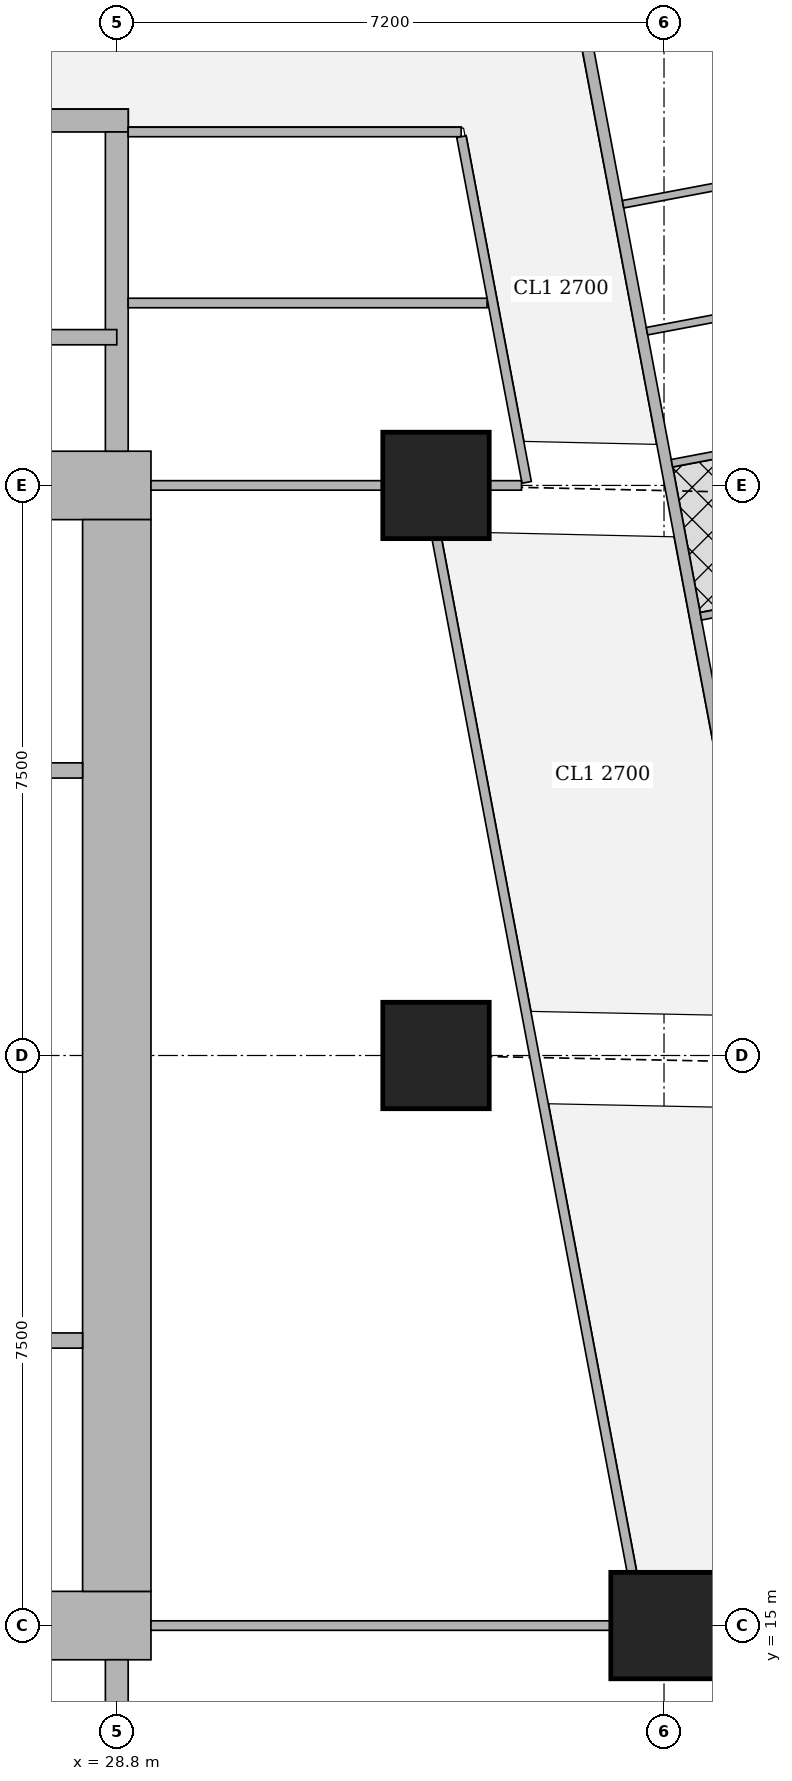
"""IFC4 building model, lengths in metres.
Left out: names, types, materials, properties, quantities, classifications, styles, units other than length and angle.
Written with IfcOpenShell. Run it as: python <this file> out.ifc"""

import sys

from ifc_helpers import new_model, si_unit, direction, frame, frame_2d, origin, origin_2d, place, context, subcontext, project, spatial, rectangle, extrude, element, fill, save


model = new_model("IFC4")
c1 = context("Model", 3, precision=1e-05, world=origin(), true_north=direction((0.0, 1.0)))
c2 = subcontext(c1, "Body", "Model", "MODEL_VIEW")
j1 = project(units=[si_unit("LENGTHUNIT", "METRE"), si_unit("PLANEANGLEUNIT", "RADIAN")], contexts=[c1])
p1 = place(None, origin())
s1 = spatial("IfcSite", under=j1, at=p1, CompositionType="ELEMENT")
p2 = place(p1, origin())
s2 = spatial("IfcBuilding", under=s1, at=p2, CompositionType="ELEMENT")
p3 = place(p2, frame((0.0, 0.0, 223.7)))
s3 = spatial("IfcBuildingStorey", under=s2, at=p3, CompositionType="ELEMENT", Elevation=223.7)
for number, where, z_axis, x_axis in (
    (1, (36.0, 15.0, 0.0), (0.0, 0.0, 1.0), (1.0, 0.0, 0.0)),
    (2, (33.0, 22.5, 0.0), (0.0, 0.0, 1.0), (1.0, 0.0, 0.0)),
    (3, (33.0, 30.0, 0.0), (0.0, 0.0, 1.0), (1.0, 0.0, 0.0)),
):
    element("IfcColumn", number, at=place(p3, frame(where, z_axis=z_axis, x_axis=x_axis)), inside=s3, PredefinedType="COLUMN", context=c2, shape_type="SweptSolid", body=[
        extrude(rectangle(XDim=1.4, YDim=1.4, at=origin_2d()), origin(), (0.0, 0.0, 1.0), 3.75),
    ])
p4 = place(p3, frame((13.95, 15.0, 0.0), z_axis=(0.0, 0.0, 1.0), x_axis=(1.0, 0.0, 0.0)))
e4 = element("IfcWall", 4, at=p4, inside=s3, PredefinedType="SHEAR", context=c2, shape_type="SweptSolid", body=[
    extrude(rectangle(XDim=15.3, YDim=0.9, at=frame_2d((7.65, 0.0))), origin(), (0.0, 0.0, 1.0), 3.75),
])
p5 = place(p4, frame((4.45, 0.0, 0.0)))
e5 = element("IfcOpeningElement", 5, at=p5, cuts=e4, PredefinedType="OPENING", context=c2, shape_type="SweptSolid", body=[
    extrude(rectangle(XDim=1.8, YDim=2.1, at=frame_2d((0.9, 1.05))), frame((0.0, 0.46, 0.0), z_axis=(0.0, -1.0, 0.0), x_axis=(1.0, 0.0, 0.0)), (0.0, 0.0, 1.0), 0.92),
])
p6 = place(p4, frame((10.7, 0.0, 0.0)))
e6 = element("IfcOpeningElement", 6, at=p6, cuts=e4, PredefinedType="OPENING", context=c2, shape_type="SweptSolid", body=[
    extrude(rectangle(XDim=1.1, YDim=2.1, at=frame_2d((0.55, 1.05))), frame((0.0, 0.46, 0.0), z_axis=(0.0, -1.0, 0.0), x_axis=(1.0, 0.0, 0.0)), (0.0, 0.0, 1.0), 0.92),
])
p7 = place(p3, frame((13.95, 30.0, 0.0), z_axis=(0.0, 0.0, 1.0), x_axis=(1.0, 0.0, 0.0)))
e7 = element("IfcWall", 7, at=p7, inside=s3, PredefinedType="SHEAR", context=c2, shape_type="SweptSolid", body=[
    extrude(rectangle(XDim=15.3, YDim=0.9, at=frame_2d((7.65, 0.0))), origin(), (0.0, 0.0, 1.0), 3.75),
])
p8 = place(p7, frame((4.45, 0.0, 0.0)))
e8 = element("IfcOpeningElement", 8, at=p8, cuts=e7, PredefinedType="OPENING", context=c2, shape_type="SweptSolid", body=[
    extrude(rectangle(XDim=1.8, YDim=2.1, at=frame_2d((0.9, 1.05))), frame((0.0, 0.46, 0.0), z_axis=(0.0, -1.0, 0.0), x_axis=(1.0, 0.0, 0.0)), (0.0, 0.0, 1.0), 0.92),
])
p9 = place(p7, frame((10.7, 0.0, 0.0)))
e9 = element("IfcOpeningElement", 9, at=p9, cuts=e7, PredefinedType="OPENING", context=c2, shape_type="SweptSolid", body=[
    extrude(rectangle(XDim=1.1, YDim=2.1, at=frame_2d((0.55, 1.05))), frame((0.0, 0.46, 0.0), z_axis=(0.0, -1.0, 0.0), x_axis=(1.0, 0.0, 0.0)), (0.0, 0.0, 1.0), 0.92),
])
p10 = place(p3, frame((28.8, 15.45, 0.0), z_axis=(0.0, 0.0, 1.0), x_axis=(0.0, 1.0, 0.0)))
e10 = element("IfcWall", 10, at=p10, inside=s3, PredefinedType="SHEAR", context=c2, shape_type="SweptSolid", body=[
    extrude(rectangle(XDim=14.1, YDim=0.9, at=frame_2d((7.05, 0.0))), origin(), (0.0, 0.0, 1.0), 3.75),
])
p11 = place(p3, frame((28.8, 10.35, 0.0), z_axis=(0.0, 0.0, 1.0), x_axis=(0.0, 1.0, 0.0)))
e11 = element("IfcWall", 11, at=p11, inside=s3, PredefinedType="SHEAR", context=c2, shape_type="SweptSolid", body=[
    extrude(rectangle(XDim=4.2, YDim=0.3, at=frame_2d((2.1, 0.0))), origin(), (0.0, 0.0, 1.0), 3.75),
])
p12 = place(p3, frame((21.45, 34.8, 0.0), z_axis=(0.0, 0.0, 1.0), x_axis=(1.0, 0.0, 0.0)))
e12 = element("IfcWall", 12, at=p12, inside=s3, PredefinedType="SHEAR", context=c2, shape_type="SweptSolid", body=[
    extrude(rectangle(XDim=7.5, YDim=0.3, at=frame_2d((3.75, 0.0))), origin(), (0.0, 0.0, 1.0), 3.75),
])
p13 = place(p12, frame((0.5, 0.0, 0.0)))
e13 = element("IfcOpeningElement", 13, at=p13, cuts=e12, PredefinedType="OPENING", context=c2, shape_type="SweptSolid", body=[
    extrude(rectangle(XDim=1.1, YDim=2.1, at=frame_2d((0.55, 1.05))), frame((0.0, 0.16, 0.0), z_axis=(0.0, -1.0, 0.0), x_axis=(1.0, 0.0, 0.0)), (0.0, 0.0, 1.0), 0.32),
])
p14 = place(p3, frame((28.8, 30.45, 0.0), z_axis=(0.0, 0.0, 1.0), x_axis=(0.0, 1.0, 0.0)))
e14 = element("IfcWall", 14, at=p14, inside=s3, PredefinedType="SHEAR", context=c2, shape_type="SweptSolid", body=[
    extrude(rectangle(XDim=4.2, YDim=0.3, at=frame_2d((2.1, 0.0))), origin(), (0.0, 0.0, 1.0), 3.75),
])
p15 = place(p3, frame((33.68, 42.723, 0.0), z_axis=(0.0, 0.0, 1.0), x_axis=(0.185601160014, -0.982625162207, 0.0)))
e15 = element("IfcWall", 15, at=p15, inside=s3, PredefinedType="SOLIDWALL", context=c2, shape_type="SweptSolid", body=[
    extrude(rectangle(XDim=41.051, YDim=0.15, at=frame_2d((20.526, 0.0))), origin(), (0.0, 0.0, 1.0), 2.5),
])
p16 = place(p15, frame((16.123, 0.0, 0.0)))
e16 = element("IfcOpeningElement", 16, at=p16, cuts=e15, PredefinedType="OPENING", context=c2, shape_type="SweptSolid", body=[
    extrude(rectangle(XDim=1.0, YDim=2.1, at=frame_2d((0.5, 1.05))), frame((0.0, 0.085, 0.0), z_axis=(0.0, -1.0, 0.0), x_axis=(1.0, 0.0, 0.0)), (0.0, 0.0, 1.0), 0.17),
])
p17 = place(p15, frame((19.938, 0.0, 0.0)))
e17 = element("IfcOpeningElement", 17, at=p17, cuts=e15, PredefinedType="OPENING", context=c2, shape_type="SweptSolid", body=[
    extrude(rectangle(XDim=1.0, YDim=2.1, at=frame_2d((0.5, 1.05))), frame((0.0, 0.085, 0.0), z_axis=(0.0, -1.0, 0.0), x_axis=(1.0, 0.0, 0.0)), (0.0, 0.0, 1.0), 0.17),
])
p18 = place(p15, frame((30.902, 0.0, 0.0)))
e18 = element("IfcOpeningElement", 18, at=p18, cuts=e15, PredefinedType="OPENING", context=c2, shape_type="SweptSolid", body=[
    extrude(rectangle(XDim=1.0, YDim=2.1, at=frame_2d((0.5, 1.05))), frame((0.0, 0.085, 0.0), z_axis=(0.0, -1.0, 0.0), x_axis=(1.0, 0.0, 0.0)), (0.0, 0.0, 1.0), 0.17),
])
p19 = place(p3, frame((39.24, 32.683, 0.0), z_axis=(0.0, 0.0, 1.0), x_axis=(-0.982638553676, -0.185530247748, 0.0)))
e19 = element("IfcWall", 19, at=p19, inside=s3, PredefinedType="PARTITIONING", context=c2, shape_type="SweptSolid", body=[
    extrude(rectangle(XDim=3.525, YDim=0.1, at=frame_2d((1.763, 0.0))), origin(), (0.0, 0.0, 1.0), 3.5),
])
p20 = place(p3, frame((39.997, 28.942, 0.0), z_axis=(0.0, 0.0, 1.0), x_axis=(-0.982613029841, -0.185665380691, 0.0)))
e20 = element("IfcWall", 20, at=p20, inside=s3, PredefinedType="PARTITIONING", context=c2, shape_type="SweptSolid", body=[
    extrude(rectangle(XDim=3.575, YDim=0.1, at=frame_2d((1.788, 0.0))), origin(), (0.0, 0.0, 1.0), 3.5),
])
p21 = place(p3, frame((39.567, 30.947, 0.0), z_axis=(0.0, 0.0, 1.0), x_axis=(-0.982576058723, -0.185860939478, 0.0)))
e21 = element("IfcWall", 21, at=p21, inside=s3, PredefinedType="PARTITIONING", context=c2, shape_type="SweptSolid", body=[
    extrude(rectangle(XDim=3.524, YDim=0.1, at=frame_2d((1.762, 0.0))), origin(), (0.0, 0.0, 1.0), 2.5),
])
p22 = place(p3, frame((38.924, 34.353, 0.0), z_axis=(0.0, 0.0, 1.0), x_axis=(-0.982629014545, -0.18558076348, 0.0)))
e22 = element("IfcWall", 22, at=p22, inside=s3, PredefinedType="PARTITIONING", context=c2, shape_type="SweptSolid", body=[
    extrude(rectangle(XDim=3.524, YDim=0.1, at=frame_2d((1.762, 0.0))), origin(), (0.0, 0.0, 1.0), 3.5),
])
p23 = place(p3, frame((28.95, 34.65, 0.0), z_axis=(0.0, 0.0, 1.0), x_axis=(1.0, 0.0, 0.0)))
e23 = element("IfcWall", 23, at=p23, inside=s3, PredefinedType="PARTITIONING", context=c2, shape_type="SweptSolid", body=[
    extrude(rectangle(XDim=4.381, YDim=0.125, at=frame_2d((2.19, 0.0))), origin(), (0.0, 0.0, 1.0), 3.5),
])
p24 = place(p3, frame((34.193, 30.04, 0.0), z_axis=(0.0, 0.0, 1.0), x_axis=(-0.185626015863, 0.982620467034, 0.0)))
e24 = element("IfcWall", 24, at=p24, inside=s3, PredefinedType="PARTITIONING", context=c2, shape_type="SweptSolid", body=[
    extrude(rectangle(XDim=4.628, YDim=0.125, at=frame_2d((2.314, 0.0))), origin(), (0.0, 0.0, 1.0), 2.5),
])
p25 = place(p24, frame((0.95, 0.0, 0.0)))
e25 = element("IfcOpeningElement", 25, at=p25, cuts=e24, PredefinedType="OPENING", context=c2, shape_type="SweptSolid", body=[
    extrude(rectangle(XDim=1.0, YDim=2.1, at=frame_2d((0.5, 1.05))), frame((0.0, 0.073, 0.0), z_axis=(0.0, -1.0, 0.0), x_axis=(1.0, 0.0, 0.0)), (0.0, 0.0, 1.0), 0.145),
])
p26 = place(p24, frame((3.225, 0.0, 0.0)))
e26 = element("IfcOpeningElement", 26, at=p26, cuts=e24, PredefinedType="OPENING", context=c2, shape_type="SweptSolid", body=[
    extrude(rectangle(XDim=1.0, YDim=2.1, at=frame_2d((0.5, 1.05))), frame((0.0, 0.073, 0.0), z_axis=(0.0, -1.0, 0.0), x_axis=(1.0, 0.0, 0.0)), (0.0, 0.0, 1.0), 0.145),
])
p27 = place(p3, frame((35.576, 15.713, 0.0), z_axis=(0.0, 0.0, 1.0), x_axis=(-0.185602982696, 0.982624817931, 0.0)))
e27 = element("IfcWall", 27, at=p27, inside=s3, PredefinedType="PARTITIONING", context=c2, shape_type="SweptSolid", body=[
    extrude(rectangle(XDim=13.814, YDim=0.125, at=frame_2d((6.907, 0.0))), origin(), (0.0, 0.0, 1.0), 2.5),
])
p28 = place(p27, frame((5.3, 0.0, 0.0)))
e28 = element("IfcOpeningElement", 28, at=p28, cuts=e27, PredefinedType="OPENING", context=c2, shape_type="SweptSolid", body=[
    extrude(rectangle(XDim=1.0, YDim=2.1, at=frame_2d((0.5, 1.05))), frame((0.0, 0.073, 0.0), z_axis=(0.0, -1.0, 0.0), x_axis=(1.0, 0.0, 0.0)), (0.0, 0.0, 1.0), 0.145),
])
p29 = place(p3, frame((29.25, 15.0, 0.0), z_axis=(0.0, 0.0, 1.0), x_axis=(1.0, 0.0, 0.0)))
e29 = element("IfcWall", 29, at=p29, inside=s3, PredefinedType="PARTITIONING", context=c2, shape_type="SweptSolid", body=[
    extrude(rectangle(XDim=6.049, YDim=0.125, at=frame_2d((3.024, 0.0))), origin(), (0.0, 0.0, 1.0), 3.5),
])
p30 = place(p3, frame((29.25, 30.0, 0.0), z_axis=(0.0, 0.0, 1.0), x_axis=(1.0, 0.0, 0.0)))
e30 = element("IfcWall", 30, at=p30, inside=s3, PredefinedType="PARTITIONING", context=c2, shape_type="SweptSolid", body=[
    extrude(rectangle(XDim=3.049, YDim=0.125, at=frame_2d((1.524, 0.0))), origin(), (0.0, 0.0, 1.0), 3.5),
])
p31 = place(p3, frame((33.701, 30.0, 0.0), z_axis=(0.0, 0.0, 1.0), x_axis=(1.0, 0.0, 0.0)))
e31 = element("IfcWall", 31, at=p31, inside=s3, PredefinedType="PARTITIONING", context=c2, shape_type="SweptSolid", body=[
    extrude(rectangle(XDim=0.424, YDim=0.125, at=frame_2d((0.212, 0.0))), origin(), (0.0, 0.0, 1.0), 2.5),
])
p32 = place(p3, frame((28.95, 32.4, 0.0), z_axis=(0.0, 0.0, 1.0), x_axis=(1.0, 0.0, 0.0)))
e32 = element("IfcWall", 32, at=p32, inside=s3, PredefinedType="PARTITIONING", context=c2, shape_type="SweptSolid", body=[
    extrude(rectangle(XDim=4.722, YDim=0.125, at=frame_2d((2.361, 0.0))), origin(), (0.0, 0.0, 1.0), 3.5),
])
p33 = place(p3, frame((23.0, 31.95, 0.0), z_axis=(0.0, 0.0, 1.0), x_axis=(1.0, 0.0, 0.0)))
e33 = element("IfcWall", 33, at=p33, inside=s3, PredefinedType="SHEAR", context=c2, shape_type="SweptSolid", body=[
    extrude(rectangle(XDim=5.8, YDim=0.2, at=frame_2d((2.9, 0.0))), origin(), (0.0, 0.0, 1.0), 3.75),
])
for number, where, z_axis, x_axis in (
    (34, (27.4, 18.75, 0.0), (0.0, 0.0, 1.0), (1.0, 0.0, 0.0)),
    (35, (27.4, 26.25, 0.0), (0.0, 0.0, 1.0), (1.0, 0.0, 0.0)),
):
    element("IfcWall", number, at=place(p3, frame(where, z_axis=z_axis, x_axis=x_axis)), inside=s3, PredefinedType="SOLIDWALL", context=c2, shape_type="SweptSolid", body=[
        extrude(rectangle(XDim=0.95, YDim=0.2, at=frame_2d((0.475, 0.0))), origin(), (0.0, 0.0, 1.0), 3.5),
    ])
p34 = place(p28, origin())
e36 = element("IfcDoor", 36, at=p34, inside=s3, OperationType="SINGLE_SWING_LEFT", PredefinedType="DOOR", context=c2, shape_type="SweptSolid", body=[
    extrude(rectangle(XDim=1.0, YDim=2.1, at=frame_2d((0.5, 1.05))), frame((0.0, 0.025, 0.0), z_axis=(0.0, -1.0, 0.0), x_axis=(1.0, 0.0, 0.0)), (0.0, 0.0, 1.0), 0.05),
])
fill(e28, e36)
p35 = place(p25, origin())
e37 = element("IfcDoor", 37, at=p35, inside=s3, OperationType="SINGLE_SWING_RIGHT", PredefinedType="DOOR", context=c2, shape_type="SweptSolid", body=[
    extrude(rectangle(XDim=1.0, YDim=2.1, at=frame_2d((0.5, 1.05))), frame((0.0, 0.025, 0.0), z_axis=(0.0, -1.0, 0.0), x_axis=(1.0, 0.0, 0.0)), (0.0, 0.0, 1.0), 0.05),
])
fill(e25, e37)
p36 = place(p26, origin())
e38 = element("IfcDoor", 38, at=p36, inside=s3, OperationType="SINGLE_SWING_RIGHT", PredefinedType="DOOR", context=c2, shape_type="SweptSolid", body=[
    extrude(rectangle(XDim=1.0, YDim=2.1, at=frame_2d((0.5, 1.05))), frame((0.0, 0.025, 0.0), z_axis=(0.0, -1.0, 0.0), x_axis=(1.0, 0.0, 0.0)), (0.0, 0.0, 1.0), 0.05),
])
fill(e26, e38)
save(model, sys.argv[1])
